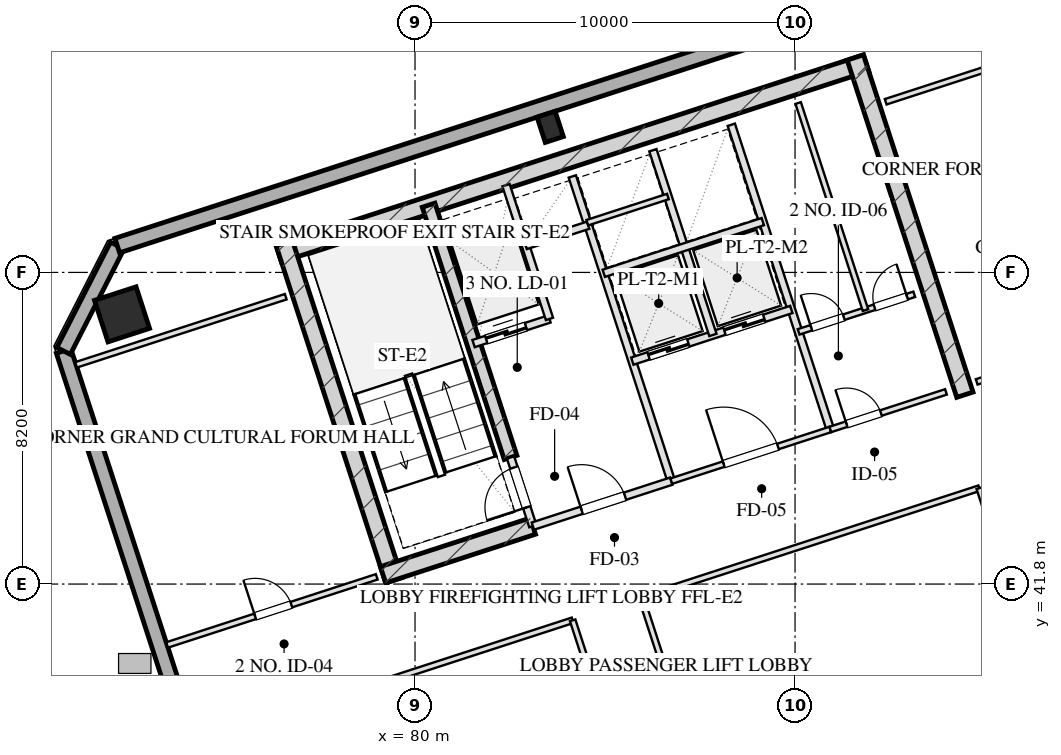
"""IFC4 building model, lengths in metres.
Left out: names, types, materials, properties, quantities, classifications, styles, units other than length and angle.
Written with IfcOpenShell. Run it as: python <this file> out.ifc"""

import sys

from ifc_helpers import new_model, si_unit, direction, frame, frame_2d, origin, origin_2d, place, context, subcontext, project, spatial, rectangle, hollow_rectangle, extrude, element, fill, save


model = new_model("IFC4")
c1 = context("Model", 3, precision=1e-05, world=origin(), true_north=direction((0.0, 1.0)))
c2 = subcontext(c1, "Body", "Model", "MODEL_VIEW")
j1 = project(units=[si_unit("LENGTHUNIT", "METRE"), si_unit("PLANEANGLEUNIT", "RADIAN")], contexts=[c1])
p1 = place(None, origin())
s1 = spatial("IfcSite", under=j1, at=p1, CompositionType="ELEMENT")
p2 = place(p1, origin())
s2 = spatial("IfcBuilding", under=s1, at=p2, CompositionType="ELEMENT")
p3 = place(p2, frame((0.0, 0.0, 205.85)))
s3 = spatial("IfcBuildingStorey", under=s2, at=p3, CompositionType="ELEMENT", Elevation=205.85)
p4 = place(p3, frame((76.415, 50.489, 0.0), z_axis=(0.0, 0.0, 1.0), x_axis=(0.951056810414, 0.309016089169, 0.0)))
e1 = element("IfcWall", 1, at=p4, inside=s3, PredefinedType="SHEAR", context=c2, shape_type="SweptSolid", body=[
    extrude(rectangle(XDim=16.25, YDim=0.45, at=frame_2d((8.125, 0.0))), origin(), (0.0, 0.0, 1.0), 3.45),
])
for number, where, z_axis, x_axis in (
    (2, (79.442, 41.899, 0.0), (0.0, 0.0, 1.0), (-0.309, 0.951, 0.0)),
    (3, (94.469, 46.781, 0.0), (0.0, 0.0, 1.0), (-0.309, 0.951, 0.0)),
):
    element("IfcWall", number, at=place(p3, frame(where, z_axis=z_axis, x_axis=x_axis)), inside=s3, PredefinedType="SHEAR", context=c2, shape_type="SweptSolid", body=[
        extrude(rectangle(XDim=9.33, YDim=0.45, at=frame_2d((4.665, 0.0))), origin(), (0.0, 0.0, 1.0), 3.45),
    ])
p5 = place(p3, frame((82.514, 45.131, 0.0), z_axis=(0.0, 0.0, 1.0), x_axis=(-0.308988790936, 0.951065679686, 0.0)))
e4 = element("IfcWall", 4, at=p5, inside=s3, PredefinedType="SHEAR", context=c2, shape_type="SweptSolid", body=[
    extrude(rectangle(XDim=6.98, YDim=0.35, at=frame_2d((3.49, 0.0))), origin(), (0.0, 0.0, 1.0), 3.45),
])
p6 = place(p3, frame((79.159, 42.043, 0.0), z_axis=(0.0, 0.0, 1.0), x_axis=(0.951047485828, 0.309044785913, 0.0)))
e5 = element("IfcWall", 5, at=p6, inside=s3, PredefinedType="SHEAR", context=c2, shape_type="SweptSolid", body=[
    extrude(rectangle(XDim=4.145, YDim=0.45, at=frame_2d((2.073, 0.0))), origin(), (0.0, 0.0, 1.0), 3.45),
])
for number, where, z_axis, x_axis in (
    (6, (95.572, 56.461, 0.0), (0.0, 0.0, 1.0), (0.951, 0.309, 0.0)),
    (7, (72.29, 48.896, 0.0), (0.0, 0.0, 1.0), (0.951, 0.309, 0.0)),
):
    element("IfcColumn", number, at=place(p3, frame(where, z_axis=z_axis, x_axis=x_axis)), inside=s3, PredefinedType="COLUMN", context=c2, shape_type="SweptSolid", body=[
        extrude(hollow_rectangle(XDim=1.15, YDim=1.15, WallThickness=0.04, at=origin_2d()), origin(), (0.0, 0.0, 1.0), 3.451),
    ])
p7 = place(p3, frame((83.557, 53.83, 0.0), z_axis=(0.0, 0.0, 1.0), x_axis=(0.951056516295, 0.309016994375, 0.0)))
e8 = element("IfcColumn", 8, at=p7, inside=s3, PredefinedType="COLUMN", context=c2, shape_type="SweptSolid", body=[
    extrude(hollow_rectangle(XDim=0.5, YDim=0.7, WallThickness=0.025, at=origin_2d()), origin(), (0.0, 0.0, 1.0), 3.451),
])
p8 = place(p3, frame((82.618, 11.414, 0.0), z_axis=(0.0, 0.0, 1.0), x_axis=(-0.309016491071, 0.951056679828, 0.0)))
e9 = element("IfcWall", 9, at=p8, inside=s3, PredefinedType="SOLIDWALL", context=c2, shape_type="SweptSolid", body=[
    extrude(rectangle(XDim=38.4, YDim=0.4, at=frame_2d((19.2, 0.0))), origin(), (0.0, 0.0, 1.0), 2.61),
])
p9 = place(p8, frame((11.75, 0.0, 0.75)))
e10 = element("IfcOpeningElement", 10, at=p9, cuts=e9, PredefinedType="OPENING", context=c2, shape_type="SweptSolid", body=[
    extrude(rectangle(XDim=2.1, YDim=1.46, at=frame_2d((1.05, 0.73))), frame((0.0, 0.21, 0.0), z_axis=(0.0, -1.0, 0.0), x_axis=(1.0, 0.0, 0.0)), (0.0, 0.0, 1.0), 0.42),
])
p10 = place(p8, frame((15.55, 0.0, 0.75)))
e11 = element("IfcOpeningElement", 11, at=p10, cuts=e9, PredefinedType="OPENING", context=c2, shape_type="SweptSolid", body=[
    extrude(rectangle(XDim=2.1, YDim=1.46, at=frame_2d((1.05, 0.73))), frame((0.0, 0.21, 0.0), z_axis=(0.0, -1.0, 0.0), x_axis=(1.0, 0.0, 0.0)), (0.0, 0.0, 1.0), 0.42),
])
p11 = place(p8, frame((23.05, 0.0, 0.0)))
e12 = element("IfcOpeningElement", 12, at=p11, cuts=e9, PredefinedType="OPENING", context=c2, shape_type="SweptSolid", body=[
    extrude(rectangle(XDim=1.1, YDim=2.15, at=frame_2d((0.55, 1.075))), frame((0.0, 0.21, 0.0), z_axis=(0.0, -1.0, 0.0), x_axis=(1.0, 0.0, 0.0)), (0.0, 0.0, 1.0), 0.42),
])
p12 = place(p3, frame((70.752, 47.934, 0.0), z_axis=(0.0, 0.0, 1.0), x_axis=(0.453949291228, 0.891027519774, 0.0)))
e13 = element("IfcWall", 13, at=p12, inside=s3, PredefinedType="SOLIDWALL", context=c2, shape_type="SweptSolid", body=[
    extrude(rectangle(XDim=3.111, YDim=0.4, at=frame_2d((1.556, 0.0))), origin(), (0.0, 0.0, 1.0), 2.61),
])
p13 = place(p3, frame((72.165, 50.706, 0.0), z_axis=(0.0, 0.0, 1.0), x_axis=(0.951058012937, 0.309012388148, 0.0)))
e14 = element("IfcWall", 14, at=p13, inside=s3, PredefinedType="SOLIDWALL", context=c2, shape_type="SweptSolid", body=[
    extrude(rectangle(XDim=23.6, YDim=0.4, at=frame_2d((11.8, 0.0))), origin(), (0.0, 0.0, 1.0), 2.61),
])
p14 = place(p3, frame((83.101, 43.324, 0.0), z_axis=(0.0, 0.0, 1.0), x_axis=(-0.309048298632, 0.951046344356, 0.0)))
e15 = element("IfcWall", 15, at=p14, inside=s3, PredefinedType="PARTITIONING", context=c2, shape_type="SweptSolid", body=[
    extrude(rectangle(XDim=1.9, YDim=0.2, at=frame_2d((0.95, 0.0))), origin(), (0.0, 0.0, 1.0), 3.175),
])
p15 = place(p14, frame((0.52, 0.0, 0.0)))
e16 = element("IfcOpeningElement", 16, at=p15, cuts=e15, PredefinedType="OPENING", context=c2, shape_type="SweptSolid", body=[
    extrude(rectangle(XDim=1.1, YDim=2.05, at=frame_2d((0.55, 1.025))), frame((0.0, 0.11, 0.0), z_axis=(0.0, -1.0, 0.0), x_axis=(1.0, 0.0, 0.0)), (0.0, 0.0, 1.0), 0.22),
])
p16 = place(p3, frame((86.743, 44.508, 0.0), z_axis=(0.0, 0.0, 1.0), x_axis=(-0.309016001439, 0.951056838919, 0.0)))
e17 = element("IfcWall", 17, at=p16, inside=s3, PredefinedType="PARTITIONING", context=c2, shape_type="SweptSolid", body=[
    extrude(rectangle(XDim=8.43, YDim=0.2, at=frame_2d((4.215, 0.0))), origin(), (0.0, 0.0, 1.0), 3.175),
])
p17 = place(p3, frame((83.101, 43.324, 0.0), z_axis=(0.0, 0.0, 1.0), x_axis=(0.951052804469, 0.309028417967, 0.0)))
e18 = element("IfcWall", 18, at=p17, inside=s3, PredefinedType="PARTITIONING", context=c2, shape_type="SweptSolid", body=[
    extrude(rectangle(XDim=3.83, YDim=0.2, at=frame_2d((1.915, 0.0))), origin(), (0.0, 0.0, 1.0), 3.175),
])
p18 = place(p17, frame((1.35, 0.0, 0.0)))
e19 = element("IfcOpeningElement", 19, at=p18, cuts=e18, PredefinedType="OPENING", context=c2, shape_type="SweptSolid", body=[
    extrude(rectangle(XDim=1.2, YDim=2.05, at=frame_2d((0.6, 1.025))), frame((0.0, 0.11, 0.0), z_axis=(0.0, -1.0, 0.0), x_axis=(1.0, 0.0, 0.0)), (0.0, 0.0, 1.0), 0.22),
])
p19 = place(p3, frame((81.54, 48.127, 0.0), z_axis=(0.0, 0.0, 1.0), x_axis=(0.951062257173, 0.308999325213, 0.0)))
e20 = element("IfcWall", 20, at=p19, inside=s3, PredefinedType="PARTITIONING", context=c2, shape_type="SweptSolid", body=[
    extrude(rectangle(XDim=2.1, YDim=0.2, at=frame_2d((1.05, 0.0))), origin(), (0.0, 0.0, 1.0), 3.175),
])
p20 = place(p19, frame((0.35, 0.0, 0.0)))
e21 = element("IfcOpeningElement", 21, at=p20, cuts=e20, PredefinedType="OPENING", context=c2, shape_type="SweptSolid", body=[
    extrude(rectangle(XDim=1.1, YDim=2.05, at=frame_2d((0.55, 1.025))), frame((0.0, 0.11, 0.0), z_axis=(0.0, -1.0, 0.0), x_axis=(1.0, 0.0, 0.0)), (0.0, 0.0, 1.0), 0.22),
])
p21 = place(p3, frame((83.538, 48.776, 0.0), z_axis=(0.0, 0.0, 1.0), x_axis=(-0.3089935693, 0.951064127245, 0.0)))
e22 = element("IfcWall", 22, at=p21, inside=s3, PredefinedType="PARTITIONING", context=c2, shape_type="SweptSolid", body=[
    extrude(rectangle(XDim=3.7, YDim=0.2, at=frame_2d((1.85, 0.0))), origin(), (0.0, 0.0, 1.0), 3.175),
])
p22 = place(p3, frame((82.91, 50.707, 0.0), z_axis=(0.0, 0.0, 1.0), x_axis=(0.951041328149, 0.309063734775, 0.0)))
e23 = element("IfcWall", 23, at=p22, inside=s3, PredefinedType="PARTITIONING", context=c2, shape_type="SweptSolid", body=[
    extrude(rectangle(XDim=1.73, YDim=0.2, at=frame_2d((0.865, 0.0))), origin(), (0.0, 0.0, 1.0), 3.175),
])
p23 = place(p3, frame((90.928, 45.868, 0.0), z_axis=(0.0, 0.0, 1.0), x_axis=(-0.309042196757, 0.951048327176, 0.0)))
e24 = element("IfcWall", 24, at=p23, inside=s3, PredefinedType="PARTITIONING", context=c2, shape_type="SweptSolid", body=[
    extrude(rectangle(XDim=8.43, YDim=0.2, at=frame_2d((4.215, 0.0))), origin(), (0.0, 0.0, 1.0), 3.175),
])
p24 = place(p3, frame((86.743, 44.508, 0.0), z_axis=(0.0, 0.0, 1.0), x_axis=(0.951063829732, 0.308994485023, 0.0)))
e25 = element("IfcWall", 25, at=p24, inside=s3, PredefinedType="PARTITIONING", context=c2, shape_type="SweptSolid", body=[
    extrude(rectangle(XDim=4.4, YDim=0.15, at=frame_2d((2.2, 0.0))), origin(), (0.0, 0.0, 1.0), 3.175),
])
p25 = place(p24, frame((1.45, 0.0, 0.0)))
e26 = element("IfcOpeningElement", 26, at=p25, cuts=e25, PredefinedType="OPENING", context=c2, shape_type="SweptSolid", body=[
    extrude(rectangle(XDim=1.5, YDim=2.05, at=frame_2d((0.75, 1.025))), frame((0.0, 0.085, 0.0), z_axis=(0.0, -1.0, 0.0), x_axis=(1.0, 0.0, 0.0)), (0.0, 0.0, 1.0), 0.17),
])
p26 = place(p3, frame((85.718, 47.666, 0.0), z_axis=(0.0, 0.0, 1.0), x_axis=(0.951058531764, 0.30901079133, 0.0)))
e27 = element("IfcWall", 27, at=p26, inside=s3, PredefinedType="PARTITIONING", context=c2, shape_type="SweptSolid", body=[
    extrude(rectangle(XDim=4.4, YDim=0.2, at=frame_2d((2.2, 0.0))), origin(), (0.0, 0.0, 1.0), 3.175),
])
p27 = place(p26, frame((0.45, 0.0, 0.0)))
e28 = element("IfcOpeningElement", 28, at=p27, cuts=e27, PredefinedType="OPENING", context=c2, shape_type="SweptSolid", body=[
    extrude(rectangle(XDim=1.1, YDim=2.05, at=frame_2d((0.55, 1.025))), frame((0.0, 0.11, 0.0), z_axis=(0.0, -1.0, 0.0), x_axis=(1.0, 0.0, 0.0)), (0.0, 0.0, 1.0), 0.22),
])
p28 = place(p26, frame((2.55, 0.0, 0.0)))
e29 = element("IfcOpeningElement", 29, at=p28, cuts=e27, PredefinedType="OPENING", context=c2, shape_type="SweptSolid", body=[
    extrude(rectangle(XDim=1.1, YDim=2.05, at=frame_2d((0.55, 1.025))), frame((0.0, 0.11, 0.0), z_axis=(0.0, -1.0, 0.0), x_axis=(1.0, 0.0, 0.0)), (0.0, 0.0, 1.0), 0.22),
])
p29 = place(p3, frame((87.838, 48.354, 0.0), z_axis=(0.0, 0.0, 1.0), x_axis=(-0.3090093719, 0.951058992953, 0.0)))
e30 = element("IfcWall", 30, at=p29, inside=s3, PredefinedType="PARTITIONING", context=c2, shape_type="SweptSolid", body=[
    extrude(rectangle(XDim=5.11, YDim=0.2, at=frame_2d((2.555, 0.0))), origin(), (0.0, 0.0, 1.0), 3.175),
])
p30 = place(p3, frame((84.967, 49.977, 0.0), z_axis=(0.0, 0.0, 1.0), x_axis=(0.951063829732, 0.308994485023, 0.0)))
e31 = element("IfcWall", 31, at=p30, inside=s3, PredefinedType="PARTITIONING", context=c2, shape_type="SweptSolid", body=[
    extrude(rectangle(XDim=4.4, YDim=0.2, at=frame_2d((2.2, 0.0))), origin(), (0.0, 0.0, 1.0), 3.175),
])
p31 = place(p3, frame((84.534, 51.308, 0.0), z_axis=(0.0, 0.0, 1.0), x_axis=(0.951075093106, 0.308959814982, 0.0)))
e32 = element("IfcWall", 32, at=p31, inside=s3, PredefinedType="PARTITIONING", context=c2, shape_type="SweptSolid", body=[
    extrude(rectangle(XDim=2.23, YDim=0.15, at=frame_2d((1.115, 0.0))), origin(), (0.0, 0.0, 1.0), 3.175),
])
p32 = place(p3, frame((90.928, 45.868, 0.0), z_axis=(0.0, 0.0, 1.0), x_axis=(0.951059297078, 0.309008435874, 0.0)))
e33 = element("IfcWall", 33, at=p32, inside=s3, PredefinedType="PARTITIONING", context=c2, shape_type="SweptSolid", body=[
    extrude(rectangle(XDim=3.2, YDim=0.15, at=frame_2d((1.6, 0.0))), origin(), (0.0, 0.0, 1.0), 3.175),
])
p33 = place(p32, frame((0.45, 0.0, 0.0)))
e34 = element("IfcOpeningElement", 34, at=p33, cuts=e33, PredefinedType="OPENING", context=c2, shape_type="SweptSolid", body=[
    extrude(rectangle(XDim=0.95, YDim=2.05, at=frame_2d((0.475, 1.025))), frame((0.0, 0.085, 0.0), z_axis=(0.0, -1.0, 0.0), x_axis=(1.0, 0.0, 0.0)), (0.0, 0.0, 1.0), 0.17),
])
p34 = place(p3, frame((90.094, 48.436, 0.0), z_axis=(0.0, 0.0, 1.0), x_axis=(0.951066581729, 0.308986014439, 0.0)))
e35 = element("IfcWall", 35, at=p34, inside=s3, PredefinedType="PARTITIONING", context=c2, shape_type="SweptSolid", body=[
    extrude(rectangle(XDim=3.2, YDim=0.15, at=frame_2d((1.6, 0.0))), origin(), (0.0, 0.0, 1.0), 3.175),
])
p35 = place(p34, frame((0.35, 0.0, 0.0)))
e36 = element("IfcOpeningElement", 36, at=p35, cuts=e35, PredefinedType="OPENING", context=c2, shape_type="SweptSolid", body=[
    extrude(rectangle(XDim=0.9, YDim=2.05, at=frame_2d((0.45, 1.025))), frame((0.0, 0.085, 0.0), z_axis=(0.0, -1.0, 0.0), x_axis=(1.0, 0.0, 0.0)), (0.0, 0.0, 1.0), 0.17),
])
p36 = place(p34, frame((2.1, 0.0, 0.0)))
e37 = element("IfcOpeningElement", 37, at=p36, cuts=e35, PredefinedType="OPENING", context=c2, shape_type="SweptSolid", body=[
    extrude(rectangle(XDim=0.9, YDim=2.05, at=frame_2d((0.45, 1.025))), frame((0.0, 0.085, 0.0), z_axis=(0.0, -1.0, 0.0), x_axis=(1.0, 0.0, 0.0)), (0.0, 0.0, 1.0), 0.17),
])
p37 = place(p3, frame((91.853, 49.007, 0.0), z_axis=(0.0, 0.0, 1.0), x_axis=(-0.309022487551, 0.951054731437, 0.0)))
e38 = element("IfcWall", 38, at=p37, inside=s3, PredefinedType="PARTITIONING", context=c2, shape_type="SweptSolid", body=[
    extrude(rectangle(XDim=5.73, YDim=0.15, at=frame_2d((2.865, 0.0))), origin(), (0.0, 0.0, 1.0), 3.175),
])
p38 = place(p3, frame((71.081, 47.568, 0.0), z_axis=(0.0, 0.0, 1.0), x_axis=(0.951059431056, 0.309008023519, 0.0)))
e39 = element("IfcWall", 39, at=p38, inside=s3, PredefinedType="PARTITIONING", context=c2, shape_type="SweptSolid", body=[
    extrude(rectangle(XDim=5.8, YDim=0.15, at=frame_2d((2.9, 0.0))), origin(), (0.0, 0.0, 1.0), 3.175),
])
p39 = place(p3, frame((73.476, 40.197, 0.0), z_axis=(0.0, 0.0, 1.0), x_axis=(0.951059431056, 0.309008023519, 0.0)))
e40 = element("IfcWall", 40, at=p39, inside=s3, PredefinedType="PARTITIONING", context=c2, shape_type="SweptSolid", body=[
    extrude(rectangle(XDim=5.8, YDim=0.15, at=frame_2d((2.9, 0.0))), origin(), (0.0, 0.0, 1.0), 3.175),
])
p40 = place(p39, frame((2.436, 0.0, 0.0)))
e41 = element("IfcOpeningElement", 41, at=p40, cuts=e40, PredefinedType="OPENING", context=c2, shape_type="SweptSolid", body=[
    extrude(rectangle(XDim=1.0, YDim=2.05, at=frame_2d((0.5, 1.025))), frame((0.0, 0.085, 0.0), z_axis=(0.0, -1.0, 0.0), x_axis=(1.0, 0.0, 0.0)), (0.0, 0.0, 1.0), 0.17),
])
p41 = place(p3, frame((92.385, 54.49, 0.0), z_axis=(0.0, 0.0, 1.0), x_axis=(0.951055112834, 0.309021313752, 0.0)))
e42 = element("IfcWall", 42, at=p41, inside=s3, PredefinedType="PARTITIONING", context=c2, shape_type="SweptSolid", body=[
    extrude(rectangle(XDim=5.2, YDim=0.15, at=frame_2d((2.6, 0.0))), origin(), (0.0, 0.0, 1.0), 3.175),
])
p42 = place(p3, frame((94.78, 47.119, 0.0), z_axis=(0.0, 0.0, 1.0), x_axis=(0.951055112834, 0.309021313752, 0.0)))
e43 = element("IfcWall", 43, at=p42, inside=s3, PredefinedType="PARTITIONING", context=c2, shape_type="SweptSolid", body=[
    extrude(rectangle(XDim=5.2, YDim=0.15, at=frame_2d((2.6, 0.0))), origin(), (0.0, 0.0, 1.0), 3.175),
])
p43 = place(p42, frame((2.184, 0.0, 0.0)))
e44 = element("IfcOpeningElement", 44, at=p43, cuts=e43, PredefinedType="OPENING", context=c2, shape_type="SweptSolid", body=[
    extrude(rectangle(XDim=1.0, YDim=2.05, at=frame_2d((0.5, 1.025))), frame((0.0, 0.085, 0.0), z_axis=(0.0, -1.0, 0.0), x_axis=(1.0, 0.0, 0.0)), (0.0, 0.0, 1.0), 0.17),
])
p44 = place(p3, frame((74.304, 37.648, 0.0), z_axis=(0.0, 0.0, 1.0), x_axis=(0.951059547341, 0.309007665621, 0.0)))
e45 = element("IfcWall", 45, at=p44, inside=s3, PredefinedType="PARTITIONING", context=c2, shape_type="SweptSolid", body=[
    extrude(rectangle(XDim=10.35, YDim=0.15, at=frame_2d((5.175, 0.0))), origin(), (0.0, 0.0, 1.0), 3.175),
])
p45 = place(p3, frame((85.955, 41.434, 0.0), z_axis=(0.0, 0.0, 1.0), x_axis=(0.951053063704, 0.309027620156, 0.0)))
e46 = element("IfcWall", 46, at=p45, inside=s3, PredefinedType="PARTITIONING", context=c2, shape_type="SweptSolid", body=[
    extrude(rectangle(XDim=9.35, YDim=0.15, at=frame_2d((4.675, 0.0))), origin(), (0.0, 0.0, 1.0), 3.175),
])
p46 = place(p3, frame((89.29, 25.021, 0.0), z_axis=(0.0, 0.0, 1.0), x_axis=(-0.309004459387, 0.951060589068, 0.0)))
e47 = element("IfcWall", 47, at=p46, inside=s3, PredefinedType="PARTITIONING", context=c2, shape_type="SweptSolid", body=[
    extrude(rectangle(XDim=16.64, YDim=0.15, at=frame_2d((8.32, 0.0))), origin(), (0.0, 0.0, 1.0), 3.175),
])
p47 = place(p46, frame((3.107, 0.0, 0.0)))
e48 = element("IfcOpeningElement", 48, at=p47, cuts=e47, PredefinedType="OPENING", context=c2, shape_type="SweptSolid", body=[
    extrude(rectangle(XDim=1.0, YDim=2.05, at=frame_2d((0.5, 1.025))), frame((0.0, 0.085, 0.0), z_axis=(0.0, -1.0, 0.0), x_axis=(1.0, 0.0, 0.0)), (0.0, 0.0, 1.0), 0.17),
])
p48 = place(p46, frame((11.427, 0.0, 0.0)))
e49 = element("IfcOpeningElement", 49, at=p48, cuts=e47, PredefinedType="OPENING", context=c2, shape_type="SweptSolid", body=[
    extrude(rectangle(XDim=1.0, YDim=2.05, at=frame_2d((0.5, 1.025))), frame((0.0, 0.085, 0.0), z_axis=(0.0, -1.0, 0.0), x_axis=(1.0, 0.0, 0.0)), (0.0, 0.0, 1.0), 0.17),
])
p49 = place(p3, frame((91.097, 25.608, 0.0), z_axis=(0.0, 0.0, 1.0), x_axis=(-0.30901773025, 0.951056277195, 0.0)))
e50 = element("IfcWall", 50, at=p49, inside=s3, PredefinedType="PARTITIONING", context=c2, shape_type="SweptSolid", body=[
    extrude(rectangle(XDim=16.64, YDim=0.15, at=frame_2d((8.32, 0.0))), origin(), (0.0, 0.0, 1.0), 3.175),
])
p50 = place(p49, frame((7.987, 0.0, 0.0)))
e51 = element("IfcOpeningElement", 51, at=p50, cuts=e50, PredefinedType="OPENING", context=c2, shape_type="SweptSolid", body=[
    extrude(rectangle(XDim=1.1, YDim=2.05, at=frame_2d((0.55, 1.025))), frame((0.0, 0.085, 0.0), z_axis=(0.0, -1.0, 0.0), x_axis=(1.0, 0.0, 0.0)), (0.0, 0.0, 1.0), 0.17),
])
p51 = place(p3, frame((99.989, 28.498, 0.0), z_axis=(0.0, 0.0, 1.0), x_axis=(-0.30901773025, 0.951056277195, 0.0)))
e52 = element("IfcWall", 52, at=p51, inside=s3, PredefinedType="PARTITIONING", context=c2, shape_type="SweptSolid", body=[
    extrude(rectangle(XDim=16.64, YDim=0.15, at=frame_2d((8.32, 0.0))), origin(), (0.0, 0.0, 1.0), 3.175),
])
p52 = place(p15, origin())
e53 = element("IfcDoor", 53, at=p52, inside=s3, OperationType="SINGLE_SWING_LEFT", PredefinedType="DOOR", context=c2, shape_type="SweptSolid", body=[
    extrude(rectangle(XDim=1.1, YDim=2.05, at=frame_2d((0.55, 1.025))), frame((0.0, 0.025, 0.0), z_axis=(0.0, -1.0, 0.0), x_axis=(1.0, 0.0, 0.0)), (0.0, 0.0, 1.0), 0.05),
])
fill(e16, e53)
p53 = place(p18, origin())
e54 = element("IfcDoor", 54, at=p53, inside=s3, OperationType="SINGLE_SWING_LEFT", PredefinedType="DOOR", context=c2, shape_type="SweptSolid", body=[
    extrude(rectangle(XDim=1.2, YDim=2.05, at=frame_2d((0.6, 1.025))), frame((0.0, 0.025, 0.0), z_axis=(0.0, -1.0, 0.0), x_axis=(1.0, 0.0, 0.0)), (0.0, 0.0, 1.0), 0.05),
])
fill(e19, e54)
p54 = place(p20, origin())
e55 = element("IfcDoor", 55, at=p54, inside=s3, OperationType="DOUBLE_DOOR_SLIDING", PredefinedType="DOOR", context=c2, shape_type="SweptSolid", body=[
    extrude(rectangle(XDim=1.1, YDim=2.05, at=frame_2d((0.55, 1.025))), frame((0.0, 0.025, 0.0), z_axis=(0.0, -1.0, 0.0), x_axis=(1.0, 0.0, 0.0)), (0.0, 0.0, 1.0), 0.05),
])
fill(e21, e55)
p55 = place(p25, origin())
e56 = element("IfcDoor", 56, at=p55, inside=s3, OperationType="SINGLE_SWING_LEFT", PredefinedType="DOOR", context=c2, shape_type="SweptSolid", body=[
    extrude(rectangle(XDim=1.5, YDim=2.05, at=frame_2d((0.75, 1.025))), frame((0.0, 0.025, 0.0), z_axis=(0.0, -1.0, 0.0), x_axis=(1.0, 0.0, 0.0)), (0.0, 0.0, 1.0), 0.05),
])
fill(e26, e56)
p56 = place(p27, origin())
e57 = element("IfcDoor", 57, at=p56, inside=s3, OperationType="DOUBLE_DOOR_SLIDING", PredefinedType="DOOR", context=c2, shape_type="SweptSolid", body=[
    extrude(rectangle(XDim=1.1, YDim=2.05, at=frame_2d((0.55, 1.025))), frame((0.0, 0.025, 0.0), z_axis=(0.0, -1.0, 0.0), x_axis=(1.0, 0.0, 0.0)), (0.0, 0.0, 1.0), 0.05),
])
fill(e28, e57)
p57 = place(p28, origin())
e58 = element("IfcDoor", 58, at=p57, inside=s3, OperationType="DOUBLE_DOOR_SLIDING", PredefinedType="DOOR", context=c2, shape_type="SweptSolid", body=[
    extrude(rectangle(XDim=1.1, YDim=2.05, at=frame_2d((0.55, 1.025))), frame((0.0, 0.025, 0.0), z_axis=(0.0, -1.0, 0.0), x_axis=(1.0, 0.0, 0.0)), (0.0, 0.0, 1.0), 0.05),
])
fill(e29, e58)
p58 = place(p33, origin())
e59 = element("IfcDoor", 59, at=p58, inside=s3, OperationType="SINGLE_SWING_LEFT", PredefinedType="DOOR", context=c2, shape_type="SweptSolid", body=[
    extrude(rectangle(XDim=0.95, YDim=2.05, at=frame_2d((0.475, 1.025))), frame((0.0, 0.025, 0.0), z_axis=(0.0, -1.0, 0.0), x_axis=(1.0, 0.0, 0.0)), (0.0, 0.0, 1.0), 0.05),
])
fill(e34, e59)
p59 = place(p35, origin())
e60 = element("IfcDoor", 60, at=p59, inside=s3, OperationType="SINGLE_SWING_LEFT", PredefinedType="DOOR", context=c2, shape_type="SweptSolid", body=[
    extrude(rectangle(XDim=0.9, YDim=2.05, at=frame_2d((0.45, 1.025))), frame((0.0, 0.025, 0.0), z_axis=(0.0, -1.0, 0.0), x_axis=(1.0, 0.0, 0.0)), (0.0, 0.0, 1.0), 0.05),
])
fill(e36, e60)
p60 = place(p36, origin())
e61 = element("IfcDoor", 61, at=p60, inside=s3, OperationType="SINGLE_SWING_RIGHT", PredefinedType="DOOR", context=c2, shape_type="SweptSolid", body=[
    extrude(rectangle(XDim=0.9, YDim=2.05, at=frame_2d((0.45, 1.025))), frame((0.0, 0.025, 0.0), z_axis=(0.0, -1.0, 0.0), x_axis=(1.0, 0.0, 0.0)), (0.0, 0.0, 1.0), 0.05),
])
fill(e37, e61)
p61 = place(p40, origin())
e62 = element("IfcDoor", 62, at=p61, inside=s3, OperationType="SINGLE_SWING_LEFT", PredefinedType="DOOR", context=c2, shape_type="SweptSolid", body=[
    extrude(rectangle(XDim=1.0, YDim=2.05, at=frame_2d((0.5, 1.025))), frame((0.0, 0.025, 0.0), z_axis=(0.0, -1.0, 0.0), x_axis=(1.0, 0.0, 0.0)), (0.0, 0.0, 1.0), 0.05),
])
fill(e41, e62)
save(model, sys.argv[1])
